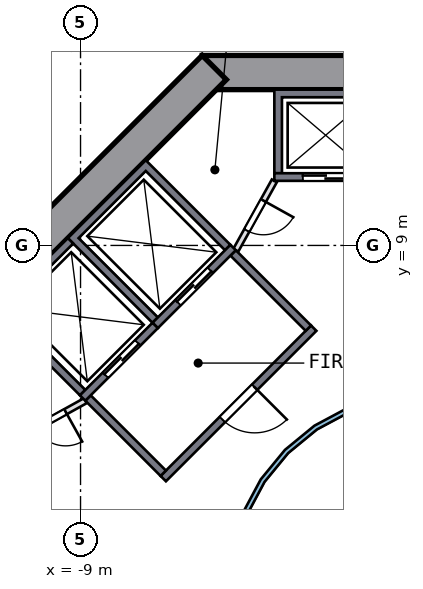
"""IFC4 building model, lengths in metres.
Left out: names, types, materials, properties, quantities, classifications, styles, units other than length and angle.
Written with IfcOpenShell. Run it as: python <this file> out.ifc"""

import sys

from ifc_helpers import new_model, si_unit, direction, frame, frame_2d, origin, place, context, subcontext, project, spatial, polyline, rectangle, outline, extrude, element, fill, save


model = new_model("IFC4")
c1 = context("Model", 3, precision=1e-05, world=origin(), true_north=direction((0.0, 1.0)))
c2 = subcontext(c1, "Body", "Model", "MODEL_VIEW")
j1 = project(units=[si_unit("LENGTHUNIT", "METRE"), si_unit("PLANEANGLEUNIT", "RADIAN")], contexts=[c1])
p1 = place(None, origin())
s1 = spatial("IfcSite", under=j1, at=p1, CompositionType="ELEMENT")
p2 = place(p1, origin())
s2 = spatial("IfcBuilding", under=s1, at=p2, CompositionType="ELEMENT")
p3 = place(p2, frame((0.0, 0.0, 23.5)))
s3 = spatial("IfcBuildingStorey", under=s2, at=p3, CompositionType="ELEMENT", Elevation=23.5)
p4 = place(p3, frame((5.799, 13.55, 0.0), z_axis=(0.0, 0.0, 1.0), x_axis=(-1.0, 0.0, 0.0)))
e1 = element("IfcWall", 1, at=p4, inside=s3, PredefinedType="SHEAR", context=c2, shape_type="SweptSolid", body=[
    extrude(rectangle(XDim=11.598, YDim=0.9, at=frame_2d((5.799, 0.0))), origin(), (0.0, 0.0, 1.0), 4.5),
])
p5 = place(p4, frame((4.899, 0.0, 0.0)))
e2 = element("IfcOpeningElement", 2, at=p5, cuts=e1, PredefinedType="OPENING", context=c2, shape_type="SweptSolid", body=[
    extrude(rectangle(XDim=1.8, YDim=2.1, at=frame_2d((0.9, 1.05))), frame((0.0, 0.46, 0.0), z_axis=(0.0, -1.0, 0.0), x_axis=(1.0, 0.0, 0.0)), (0.0, 0.0, 1.0), 0.92),
])
p6 = place(p3, frame((-5.481, 13.682, 0.0), z_axis=(0.0, 0.0, 1.0), x_axis=(-0.707106781, -0.707106781, 0.0)))
e3 = element("IfcWall", 3, at=p6, inside=s3, PredefinedType="SHEAR", context=c2, shape_type="SweptSolid", body=[
    extrude(rectangle(XDim=11.598, YDim=0.9, at=frame_2d((5.799, 0.0))), origin(), (0.0, 0.0, 1.0), 4.5),
])
p7 = place(p3, origin())
e4 = element("IfcWall", 4, at=p7, inside=s3, PredefinedType="SOLIDWALL", context=c2, shape_type="SweptSolid", body=[
    extrude(outline(polyline([(-3.9, 10.9), (-3.9, 13.1), (-1.2, 13.1), (-1.2, 10.9), (-1.4, 10.9), (-1.4, 12.9), (-3.7, 12.9), (-3.7, 10.9), (-3.9, 10.9)])), origin(), (0.0, 0.0, 1.0), 4.0),
])
p8 = place(p3, frame((-1.2, 10.8, 0.0), z_axis=(0.0, 0.0, 1.0), x_axis=(-1.0, 0.0, 0.0)))
e5 = element("IfcWall", 5, at=p8, inside=s3, PredefinedType="SOLIDWALL", context=c2, shape_type="SweptSolid", body=[
    extrude(rectangle(XDim=2.7, YDim=0.2, at=frame_2d((1.35, 0.0))), origin(), (0.0, 0.0, 1.0), 4.0),
])
p9 = place(p8, frame((0.75, 0.0, 0.0)))
e6 = element("IfcOpeningElement", 6, at=p9, cuts=e5, PredefinedType="OPENING", context=c2, shape_type="SweptSolid", body=[
    extrude(rectangle(XDim=1.2, YDim=2.1, at=frame_2d((0.6, 1.05))), frame((0.0, 0.11, 0.0), z_axis=(0.0, -1.0, 0.0), x_axis=(1.0, 0.0, 0.0)), (0.0, 0.0, 1.0), 0.22),
])
p10 = place(p3, origin())
e7 = element("IfcWall", 7, at=p10, inside=s3, PredefinedType="SOLIDWALL", context=c2, shape_type="SweptSolid", body=[
    extrude(outline(polyline([(-9.334, 9.192), (-7.283, 11.243), (-5.056, 9.016), (-5.197, 8.874), (-7.283, 10.96), (-9.051, 9.192), (-6.965, 7.106), (-7.106, 6.965), (-9.334, 9.192)])), origin(), (0.0, 0.0, 1.0), 4.0),
])
p11 = place(p3, frame((-4.985, 8.945, 0.0), z_axis=(0.0, 0.0, 1.0), x_axis=(-0.707106781, -0.707106781, 0.0)))
e8 = element("IfcWall", 8, at=p11, inside=s3, PredefinedType="SOLIDWALL", context=c2, shape_type="SweptSolid", body=[
    extrude(rectangle(XDim=2.9, YDim=0.2, at=frame_2d((1.45, 0.0))), origin(), (0.0, 0.0, 1.0), 4.0),
])
p12 = place(p11, frame((0.85, 0.0, 0.0)))
e9 = element("IfcOpeningElement", 9, at=p12, cuts=e8, PredefinedType="OPENING", context=c2, shape_type="SweptSolid", body=[
    extrude(rectangle(XDim=1.2, YDim=2.1, at=frame_2d((0.6, 1.05))), frame((0.0, 0.11, 0.0), z_axis=(0.0, -1.0, 0.0), x_axis=(1.0, 0.0, 0.0)), (0.0, 0.0, 1.0), 0.22),
])
p13 = place(p3, origin())
e10 = element("IfcWall", 10, at=p13, inside=s3, PredefinedType="SOLIDWALL", context=c2, shape_type="SweptSolid", body=[
    extrude(outline(polyline([(-11.243, 7.283), (-9.334, 9.192), (-9.192, 9.051), (-10.96, 7.283), (-8.874, 5.197), (-9.016, 5.056), (-11.243, 7.283)])), origin(), (0.0, 0.0, 1.0), 4.0),
])
p14 = place(p3, frame((-7.036, 6.894, 0.0), z_axis=(0.0, 0.0, 1.0), x_axis=(-0.707106781, -0.707106781, 0.0)))
e11 = element("IfcWall", 11, at=p14, inside=s3, PredefinedType="SOLIDWALL", context=c2, shape_type="SweptSolid", body=[
    extrude(rectangle(XDim=2.7, YDim=0.2, at=frame_2d((1.35, 0.0))), origin(), (0.0, 0.0, 1.0), 4.0),
])
p15 = place(p14, frame((0.65, 0.0, 0.0)))
e12 = element("IfcOpeningElement", 12, at=p15, cuts=e11, PredefinedType="OPENING", context=c2, shape_type="SweptSolid", body=[
    extrude(rectangle(XDim=1.2, YDim=2.1, at=frame_2d((0.6, 1.05))), frame((0.0, 0.11, 0.0), z_axis=(0.0, -1.0, 0.0), x_axis=(1.0, 0.0, 0.0)), (0.0, 0.0, 1.0), 0.22),
])
p16 = place(p3, frame((-2.864, 6.823, 0.0), z_axis=(0.0, 0.0, 1.0), x_axis=(-0.707106781, -0.707106781, 0.0)))
e13 = element("IfcWall", 13, at=p16, inside=s3, PredefinedType="SOLIDWALL", context=c2, shape_type="SweptSolid", body=[
    extrude(rectangle(XDim=5.6, YDim=0.2, at=frame_2d((2.8, 0.0))), origin(), (0.0, 0.0, 1.0), 4.0),
])
p17 = place(p16, frame((2.2, 0.0, 0.0)))
e14 = element("IfcOpeningElement", 14, at=p17, cuts=e13, PredefinedType="OPENING", context=c2, shape_type="SweptSolid", body=[
    extrude(rectangle(XDim=1.2, YDim=2.1, at=frame_2d((0.6, 1.05))), frame((0.0, 0.11, 0.0), z_axis=(0.0, -1.0, 0.0), x_axis=(1.0, 0.0, 0.0)), (0.0, 0.0, 1.0), 0.22),
])
for number, where, z_axis, x_axis in (
    (15, (-3.005, 6.823, 0.0), (0.0, 0.0, 1.0), (-0.707, 0.707, 0.0)),
    (16, (-6.823, 3.005, 0.0), (0.0, 0.0, 1.0), (-0.707, 0.707, 0.0)),
):
    element("IfcWall", number, at=place(p3, frame(where, z_axis=z_axis, x_axis=x_axis)), inside=s3, PredefinedType="SOLIDWALL", context=c2, shape_type="SweptSolid", body=[
        extrude(rectangle(XDim=2.8, YDim=0.2, at=frame_2d((1.4, 0.0))), origin(), (0.0, 0.0, 1.0), 4.0),
    ])
p18 = place(p3, frame((-3.9, 10.7, 0.0), z_axis=(0.0, 0.0, 1.0), x_axis=(-0.485692555, -0.874129705, 0.0)))
e17 = element("IfcWall", 17, at=p18, inside=s3, PredefinedType="PARTITIONING", context=c2, shape_type="SweptSolid", body=[
    extrude(rectangle(XDim=2.089, YDim=0.15, at=frame_2d((1.044, 0.0))), origin(), (0.0, 0.0, 1.0), 4.0),
])
p19 = place(p18, frame((0.594, 0.0, 0.0)))
e18 = element("IfcOpeningElement", 18, at=p19, cuts=e17, PredefinedType="OPENING", context=c2, shape_type="SweptSolid", body=[
    extrude(rectangle(XDim=0.9, YDim=2.1, at=frame_2d((0.45, 1.05))), frame((0.0, 0.085, 0.0), z_axis=(0.0, -1.0, 0.0), x_axis=(1.0, 0.0, 0.0)), (0.0, 0.0, 1.0), 0.17),
])
p20 = place(p3, frame((-8.874, 4.914, 0.0), z_axis=(0.0, 0.0, 1.0), x_axis=(-0.874129705, -0.485692555, 0.0)))
e19 = element("IfcWall", 19, at=p20, inside=s3, PredefinedType="PARTITIONING", context=c2, shape_type="SweptSolid", body=[
    extrude(rectangle(XDim=2.089, YDim=0.15, at=frame_2d((1.044, 0.0))), origin(), (0.0, 0.0, 1.0), 4.0),
])
p21 = place(p20, frame((0.594, 0.0, 0.0)))
e20 = element("IfcOpeningElement", 20, at=p21, cuts=e19, PredefinedType="OPENING", context=c2, shape_type="SweptSolid", body=[
    extrude(rectangle(XDim=0.9, YDim=2.1, at=frame_2d((0.45, 1.05))), frame((0.0, 0.085, 0.0), z_axis=(0.0, -1.0, 0.0), x_axis=(1.0, 0.0, 0.0)), (0.0, 0.0, 1.0), 0.17),
])
p22 = place(p3, origin())
e21 = element("IfcWall", 21, at=p22, inside=s3, PredefinedType="SOLIDWALL", context=c2, shape_type="SweptSolid", body=[
    extrude(outline(polyline([(5.021, -0.999), (4.73, -1.959), (4.257, -2.844), (3.62, -3.62), (2.844, -4.257), (1.959, -4.73), (0.999, -5.021), (0.0, -5.12), (-0.999, -5.021), (-1.959, -4.73), (-2.844, -4.257), (-3.62, -3.62), (-4.257, -2.844), (-4.73, -1.959), (-5.021, -0.999), (-5.12, 0.0), (-5.021, 0.999), (-4.73, 1.959), (-4.257, 2.844), (-3.62, 3.62), (-2.844, 4.257), (-1.959, 4.73), (-0.999, 5.021), (0.0, 5.12), (0.999, 5.021), (1.959, 4.73), (2.844, 4.257), (3.62, 3.62), (4.257, 2.844), (4.73, 1.959), (5.021, 0.999), (5.12, 0.0), (5.021, -0.999)]), holes=[polyline([(4.904, 0.976), (4.619, 1.913), (4.157, 2.778), (3.535, 3.535), (2.778, 4.157), (1.913, 4.619), (0.976, 4.904), (0.0, 5.0), (-0.976, 4.904), (-1.913, 4.619), (-2.778, 4.157), (-3.535, 3.535), (-4.157, 2.778), (-4.619, 1.913), (-4.904, 0.976), (-5.0, 0.0), (-4.904, -0.976), (-4.619, -1.913), (-4.157, -2.778), (-3.535, -3.535), (-2.778, -4.157), (-1.913, -4.619), (-0.976, -4.904), (0.0, -5.0), (0.976, -4.904), (1.913, -4.619), (2.778, -4.157), (3.535, -3.535), (4.157, -2.778), (4.619, -1.913), (4.904, -0.976), (5.0, 0.0), (4.904, 0.976)])]), origin(), (0.0, 0.0, 1.0), 4.0),
])
p23 = place(p3, frame((-4.823, 17.721, 0.0), z_axis=(0.0, 0.0, 1.0), x_axis=(-0.866037142, -0.499979668, 0.0)))
e22 = element("IfcWall", 22, at=p23, inside=s3, PredefinedType="PARTITIONING", context=c2, shape_type="SweptSolid", body=[
    extrude(rectangle(XDim=9.367, YDim=0.15, at=frame_2d((4.683, 0.0))), origin(), (0.0, 0.0, 1.0), 4.0),
])
p24 = place(p23, frame((3.817, 0.0, 0.0)))
e23 = element("IfcOpeningElement", 23, at=p24, cuts=e22, PredefinedType="OPENING", context=c2, shape_type="SweptSolid", body=[
    extrude(rectangle(XDim=1.8, YDim=2.1, at=frame_2d((0.9, 1.05))), frame((0.0, 0.085, 0.0), z_axis=(0.0, -1.0, 0.0), x_axis=(1.0, 0.0, 0.0)), (0.0, 0.0, 1.0), 0.17),
])
p25 = place(p9, origin())
e24 = element("IfcDoor", 24, at=p25, inside=s3, OperationType="DOUBLE_DOOR_SLIDING", PredefinedType="DOOR", context=c2, shape_type="SweptSolid", body=[
    extrude(rectangle(XDim=1.2, YDim=2.1, at=frame_2d((0.6, 1.05))), frame((0.0, 0.025, 0.0), z_axis=(0.0, -1.0, 0.0), x_axis=(1.0, 0.0, 0.0)), (0.0, 0.0, 1.0), 0.05),
])
fill(e6, e24)
p26 = place(p12, origin())
e25 = element("IfcDoor", 25, at=p26, inside=s3, OperationType="DOUBLE_DOOR_SLIDING", PredefinedType="DOOR", context=c2, shape_type="SweptSolid", body=[
    extrude(rectangle(XDim=1.2, YDim=2.1, at=frame_2d((0.6, 1.05))), frame((0.0, 0.025, 0.0), z_axis=(0.0, -1.0, 0.0), x_axis=(1.0, 0.0, 0.0)), (0.0, 0.0, 1.0), 0.05),
])
fill(e9, e25)
p27 = place(p15, origin())
e26 = element("IfcDoor", 26, at=p27, inside=s3, OperationType="DOUBLE_DOOR_SLIDING", PredefinedType="DOOR", context=c2, shape_type="SweptSolid", body=[
    extrude(rectangle(XDim=1.2, YDim=2.1, at=frame_2d((0.6, 1.05))), frame((0.0, 0.025, 0.0), z_axis=(0.0, -1.0, 0.0), x_axis=(1.0, 0.0, 0.0)), (0.0, 0.0, 1.0), 0.05),
])
fill(e12, e26)
p28 = place(p17, origin())
e27 = element("IfcDoor", 27, at=p28, inside=s3, OperationType="SINGLE_SWING_LEFT", PredefinedType="DOOR", context=c2, shape_type="SweptSolid", body=[
    extrude(rectangle(XDim=1.2, YDim=2.1, at=frame_2d((0.6, 1.05))), frame((0.0, 0.025, 0.0), z_axis=(0.0, -1.0, 0.0), x_axis=(1.0, 0.0, 0.0)), (0.0, 0.0, 1.0), 0.05),
])
fill(e14, e27)
p29 = place(p19, origin())
e28 = element("IfcDoor", 28, at=p29, inside=s3, OperationType="SINGLE_SWING_LEFT", PredefinedType="DOOR", context=c2, shape_type="SweptSolid", body=[
    extrude(rectangle(XDim=0.9, YDim=2.1, at=frame_2d((0.45, 1.05))), frame((0.0, 0.025, 0.0), z_axis=(0.0, -1.0, 0.0), x_axis=(1.0, 0.0, 0.0)), (0.0, 0.0, 1.0), 0.05),
])
fill(e18, e28)
p30 = place(p21, origin())
e29 = element("IfcDoor", 29, at=p30, inside=s3, OperationType="SINGLE_SWING_LEFT", PredefinedType="DOOR", context=c2, shape_type="SweptSolid", body=[
    extrude(rectangle(XDim=0.9, YDim=2.1, at=frame_2d((0.45, 1.05))), frame((0.0, 0.025, 0.0), z_axis=(0.0, -1.0, 0.0), x_axis=(1.0, 0.0, 0.0)), (0.0, 0.0, 1.0), 0.05),
])
fill(e20, e29)
save(model, sys.argv[1])
